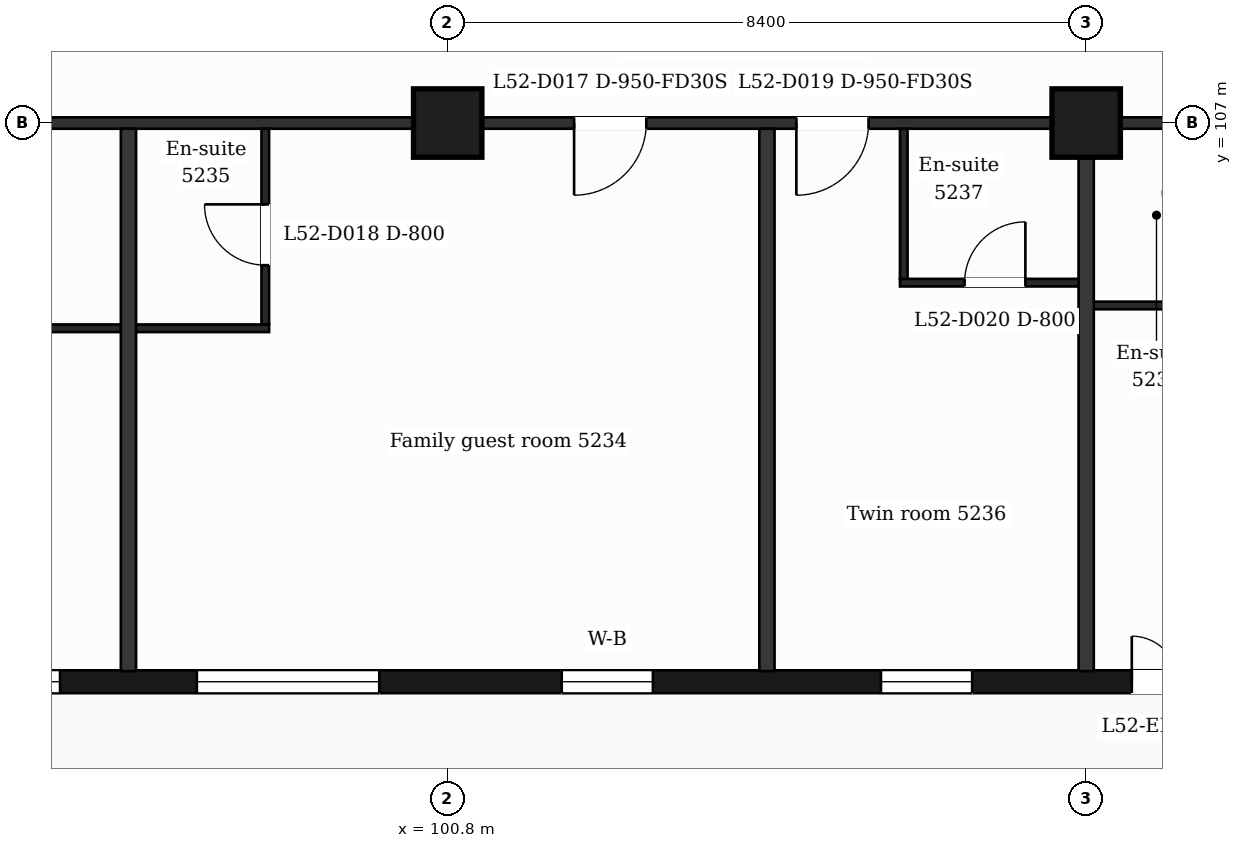
"""IFC4 building model, lengths in metres.
Left out: names, types, materials, properties, quantities, classifications, styles, units other than length and angle.
Written with IfcOpenShell. Run it as: python <this file> out.ifc"""

import sys

from ifc_helpers import new_model, si_unit, direction, frame, frame_2d, origin, origin_2d, place, context, subcontext, project, spatial, rectangle, extrude, element, fill, save


model = new_model("IFC4")
c1 = context("Model", 3, precision=1e-05, world=origin(), true_north=direction((0.0, 1.0)))
c2 = subcontext(c1, "Body", "Model", "MODEL_VIEW")
j1 = project(units=[si_unit("LENGTHUNIT", "METRE"), si_unit("PLANEANGLEUNIT", "RADIAN")], contexts=[c1])
p1 = place(None, origin())
s1 = spatial("IfcSite", under=j1, at=p1, CompositionType="ELEMENT")
p2 = place(p1, origin())
s2 = spatial("IfcBuilding", under=s1, at=p2, CompositionType="ELEMENT")
p3 = place(p2, frame((0.0, 0.0, 217.0)))
s3 = spatial("IfcBuildingStorey", under=s2, at=p3, CompositionType="ELEMENT", Elevation=217.0)
for number, where, z_axis, x_axis in (
    (1, (100.8, 107.0, 0.0), (0.0, 0.0, 1.0), (1.0, 0.0, 0.0)),
    (2, (109.2, 107.0, 0.0), (0.0, 0.0, 1.0), (1.0, 0.0, 0.0)),
):
    element("IfcColumn", number, at=place(p3, frame(where, z_axis=z_axis, x_axis=x_axis)), inside=s3, PredefinedType="COLUMN", context=c2, shape_type="SweptSolid", body=[
        extrude(rectangle(XDim=0.9, YDim=0.9, at=origin_2d()), origin(), (0.0, 0.0, 1.0), 3.7),
    ])
p4 = place(p3, frame((89.85, 99.65, 0.0), z_axis=(0.0, 0.0, 1.0), x_axis=(1.0, 0.0, 0.0)))
e3 = element("IfcWall", 3, at=p4, inside=s3, PredefinedType="SOLIDWALL", context=c2, shape_type="SweptSolid", body=[
    extrude(rectangle(XDim=47.25, YDim=0.3, at=frame_2d((23.625, 0.0))), origin(), (0.0, 0.0, 1.0), 3.38),
])
p5 = place(p4, frame((0.725, 0.0, 0.9)))
e4 = element("IfcOpeningElement", 4, at=p5, cuts=e3, PredefinedType="OPENING", context=c2, shape_type="SweptSolid", body=[
    extrude(rectangle(XDim=1.2, YDim=2.1, at=frame_2d((0.6, 1.05))), frame((0.0, 0.16, 0.0), z_axis=(0.0, -1.0, 0.0), x_axis=(1.0, 0.0, 0.0)), (0.0, 0.0, 1.0), 0.32),
])
p6 = place(p4, frame((3.45, 0.0, 0.9)))
e5 = element("IfcOpeningElement", 5, at=p6, cuts=e3, PredefinedType="OPENING", context=c2, shape_type="SweptSolid", body=[
    extrude(rectangle(XDim=2.4, YDim=2.1, at=frame_2d((1.2, 1.05))), frame((0.0, 0.16, 0.0), z_axis=(0.0, -1.0, 0.0), x_axis=(1.0, 0.0, 0.0)), (0.0, 0.0, 1.0), 0.32),
])
p7 = place(p4, frame((7.65, 0.0, 0.9)))
e6 = element("IfcOpeningElement", 6, at=p7, cuts=e3, PredefinedType="OPENING", context=c2, shape_type="SweptSolid", body=[
    extrude(rectangle(XDim=2.4, YDim=2.1, at=frame_2d((1.2, 1.05))), frame((0.0, 0.16, 0.0), z_axis=(0.0, -1.0, 0.0), x_axis=(1.0, 0.0, 0.0)), (0.0, 0.0, 1.0), 0.32),
])
p8 = place(p4, frame((12.45, 0.0, 0.9)))
e7 = element("IfcOpeningElement", 7, at=p8, cuts=e3, PredefinedType="OPENING", context=c2, shape_type="SweptSolid", body=[
    extrude(rectangle(XDim=1.2, YDim=2.1, at=frame_2d((0.6, 1.05))), frame((0.0, 0.16, 0.0), z_axis=(0.0, -1.0, 0.0), x_axis=(1.0, 0.0, 0.0)), (0.0, 0.0, 1.0), 0.32),
])
p9 = place(p4, frame((16.65, 0.0, 0.9)))
e8 = element("IfcOpeningElement", 8, at=p9, cuts=e3, PredefinedType="OPENING", context=c2, shape_type="SweptSolid", body=[
    extrude(rectangle(XDim=1.2, YDim=2.1, at=frame_2d((0.6, 1.05))), frame((0.0, 0.16, 0.0), z_axis=(0.0, -1.0, 0.0), x_axis=(1.0, 0.0, 0.0)), (0.0, 0.0, 1.0), 0.32),
])
p10 = place(p4, frame((19.95, 0.0, 0.0)))
e9 = element("IfcOpeningElement", 9, at=p10, cuts=e3, PredefinedType="OPENING", context=c2, shape_type="SweptSolid", body=[
    extrude(rectangle(XDim=1.2, YDim=2.4, at=frame_2d((0.6, 1.2))), frame((0.0, 0.16, 0.0), z_axis=(0.0, -1.0, 0.0), x_axis=(1.0, 0.0, 0.0)), (0.0, 0.0, 1.0), 0.32),
])
p11 = place(p4, frame((21.75, 0.0, 0.9)))
e10 = element("IfcOpeningElement", 10, at=p11, cuts=e3, PredefinedType="OPENING", context=c2, shape_type="SweptSolid", body=[
    extrude(rectangle(XDim=1.2, YDim=2.1, at=frame_2d((0.6, 1.05))), frame((0.0, 0.16, 0.0), z_axis=(0.0, -1.0, 0.0), x_axis=(1.0, 0.0, 0.0)), (0.0, 0.0, 1.0), 0.32),
])
p12 = place(p4, frame((24.45, 0.0, 0.9)))
e11 = element("IfcOpeningElement", 11, at=p12, cuts=e3, PredefinedType="OPENING", context=c2, shape_type="SweptSolid", body=[
    extrude(rectangle(XDim=2.4, YDim=2.1, at=frame_2d((1.2, 1.05))), frame((0.0, 0.16, 0.0), z_axis=(0.0, -1.0, 0.0), x_axis=(1.0, 0.0, 0.0)), (0.0, 0.0, 1.0), 0.32),
])
p13 = place(p4, frame((28.35, 0.0, 0.0)))
e12 = element("IfcOpeningElement", 12, at=p13, cuts=e3, PredefinedType="OPENING", context=c2, shape_type="SweptSolid", body=[
    extrude(rectangle(XDim=1.2, YDim=2.4, at=frame_2d((0.6, 1.2))), frame((0.0, 0.16, 0.0), z_axis=(0.0, -1.0, 0.0), x_axis=(1.0, 0.0, 0.0)), (0.0, 0.0, 1.0), 0.32),
])
p14 = place(p4, frame((30.15, 0.0, 0.9)))
e13 = element("IfcOpeningElement", 13, at=p14, cuts=e3, PredefinedType="OPENING", context=c2, shape_type="SweptSolid", body=[
    extrude(rectangle(XDim=1.2, YDim=2.1, at=frame_2d((0.6, 1.05))), frame((0.0, 0.16, 0.0), z_axis=(0.0, -1.0, 0.0), x_axis=(1.0, 0.0, 0.0)), (0.0, 0.0, 1.0), 0.32),
])
p15 = place(p4, frame((32.85, 0.0, 0.9)))
e14 = element("IfcOpeningElement", 14, at=p15, cuts=e3, PredefinedType="OPENING", context=c2, shape_type="SweptSolid", body=[
    extrude(rectangle(XDim=2.4, YDim=2.1, at=frame_2d((1.2, 1.05))), frame((0.0, 0.16, 0.0), z_axis=(0.0, -1.0, 0.0), x_axis=(1.0, 0.0, 0.0)), (0.0, 0.0, 1.0), 0.32),
])
p16 = place(p4, frame((37.05, 0.0, 0.9)))
e15 = element("IfcOpeningElement", 15, at=p16, cuts=e3, PredefinedType="OPENING", context=c2, shape_type="SweptSolid", body=[
    extrude(rectangle(XDim=2.4, YDim=2.1, at=frame_2d((1.2, 1.05))), frame((0.0, 0.16, 0.0), z_axis=(0.0, -1.0, 0.0), x_axis=(1.0, 0.0, 0.0)), (0.0, 0.0, 1.0), 0.32),
])
p17 = place(p4, frame((41.85, 0.0, 0.9)))
e16 = element("IfcOpeningElement", 16, at=p17, cuts=e3, PredefinedType="OPENING", context=c2, shape_type="SweptSolid", body=[
    extrude(rectangle(XDim=1.2, YDim=2.1, at=frame_2d((0.6, 1.05))), frame((0.0, 0.16, 0.0), z_axis=(0.0, -1.0, 0.0), x_axis=(1.0, 0.0, 0.0)), (0.0, 0.0, 1.0), 0.32),
])
p18 = place(p4, frame((45.25, 0.0, 0.9)))
e17 = element("IfcOpeningElement", 17, at=p18, cuts=e3, PredefinedType="OPENING", context=c2, shape_type="SweptSolid", body=[
    extrude(rectangle(XDim=1.2, YDim=2.1, at=frame_2d((0.6, 1.05))), frame((0.0, 0.16, 0.0), z_axis=(0.0, -1.0, 0.0), x_axis=(1.0, 0.0, 0.0)), (0.0, 0.0, 1.0), 0.32),
])
p19 = place(p3, frame((94.45, 104.3, 0.0), z_axis=(0.0, 0.0, 1.0), x_axis=(1.0, 0.0, 0.0)))
e18 = element("IfcWall", 18, at=p19, inside=s3, PredefinedType="PARTITIONING", context=c2, shape_type="SweptSolid", body=[
    extrude(rectangle(XDim=4.0, YDim=0.1, at=frame_2d((2.0, 0.0))), origin(), (0.0, 0.0, 1.0), 3.38),
])
p20 = place(p3, frame((109.2, 104.6, 0.0), z_axis=(0.0, 0.0, 1.0), x_axis=(1.0, 0.0, 0.0)))
e19 = element("IfcWall", 19, at=p20, inside=s3, PredefinedType="PARTITIONING", context=c2, shape_type="SweptSolid", body=[
    extrude(rectangle(XDim=1.85, YDim=0.1, at=frame_2d((0.925, 0.0))), origin(), (0.0, 0.0, 1.0), 3.38),
])
p21 = place(p3, frame((106.75, 104.9, 0.0), z_axis=(0.0, 0.0, 1.0), x_axis=(1.0, 0.0, 0.0)))
e20 = element("IfcWall", 20, at=p21, inside=s3, PredefinedType="PARTITIONING", context=c2, shape_type="SweptSolid", body=[
    extrude(rectangle(XDim=2.45, YDim=0.1, at=frame_2d((1.225, 0.0))), origin(), (0.0, 0.0, 1.0), 3.38),
])
p22 = place(p21, frame((0.85, 0.0, 0.0)))
e21 = element("IfcOpeningElement", 21, at=p22, cuts=e20, PredefinedType="OPENING", context=c2, shape_type="SweptSolid", body=[
    extrude(rectangle(XDim=0.8, YDim=2.1, at=frame_2d((0.4, 1.05))), frame((0.0, 0.06, 0.0), z_axis=(0.0, -1.0, 0.0), x_axis=(1.0, 0.0, 0.0)), (0.0, 0.0, 1.0), 0.12),
])
p23 = place(p3, frame((87.018, 107.0, 0.0), z_axis=(0.0, 0.0, 1.0), x_axis=(1.0, 0.0, 0.0)))
e22 = element("IfcWall", 22, at=p23, inside=s3, PredefinedType="PARTITIONING", context=c2, shape_type="SweptSolid", body=[
    extrude(rectangle(XDim=52.765, YDim=0.15, at=frame_2d((26.382, 0.0))), origin(), (0.0, 0.0, 1.0), 3.38),
])
p24 = place(p23, frame((1.276, 0.0, 0.0)))
e23 = element("IfcOpeningElement", 23, at=p24, cuts=e22, PredefinedType="OPENING", context=c2, shape_type="SweptSolid", body=[
    extrude(rectangle(XDim=0.95, YDim=2.1, at=frame_2d((0.475, 1.05))), frame((0.0, 0.085, 0.0), z_axis=(0.0, -1.0, 0.0), x_axis=(1.0, 0.0, 0.0)), (0.0, 0.0, 1.0), 0.17),
])
p25 = place(p23, frame((6.034, 0.0, 0.0)))
e24 = element("IfcOpeningElement", 24, at=p25, cuts=e22, PredefinedType="OPENING", context=c2, shape_type="SweptSolid", body=[
    extrude(rectangle(XDim=0.95, YDim=2.1, at=frame_2d((0.475, 1.05))), frame((0.0, 0.085, 0.0), z_axis=(0.0, -1.0, 0.0), x_axis=(1.0, 0.0, 0.0)), (0.0, 0.0, 1.0), 0.17),
])
p26 = place(p23, frame((15.445, 0.0, 0.0)))
e25 = element("IfcOpeningElement", 25, at=p26, cuts=e22, PredefinedType="OPENING", context=c2, shape_type="SweptSolid", body=[
    extrude(rectangle(XDim=0.95, YDim=2.1, at=frame_2d((0.475, 1.05))), frame((0.0, 0.085, 0.0), z_axis=(0.0, -1.0, 0.0), x_axis=(1.0, 0.0, 0.0)), (0.0, 0.0, 1.0), 0.17),
])
p27 = place(p23, frame((18.369, 0.0, 0.0)))
e26 = element("IfcOpeningElement", 26, at=p27, cuts=e22, PredefinedType="OPENING", context=c2, shape_type="SweptSolid", body=[
    extrude(rectangle(XDim=0.95, YDim=2.1, at=frame_2d((0.475, 1.05))), frame((0.0, 0.085, 0.0), z_axis=(0.0, -1.0, 0.0), x_axis=(1.0, 0.0, 0.0)), (0.0, 0.0, 1.0), 0.17),
])
p28 = place(p23, frame((24.519, 0.0, 0.0)))
e27 = element("IfcOpeningElement", 27, at=p28, cuts=e22, PredefinedType="OPENING", context=c2, shape_type="SweptSolid", body=[
    extrude(rectangle(XDim=0.95, YDim=2.1, at=frame_2d((0.475, 1.05))), frame((0.0, 0.085, 0.0), z_axis=(0.0, -1.0, 0.0), x_axis=(1.0, 0.0, 0.0)), (0.0, 0.0, 1.0), 0.17),
])
p29 = place(p23, frame((26.632, 0.0, 0.0)))
e28 = element("IfcOpeningElement", 28, at=p29, cuts=e22, PredefinedType="OPENING", context=c2, shape_type="SweptSolid", body=[
    extrude(rectangle(XDim=1.0, YDim=2.1, at=frame_2d((0.5, 1.05))), frame((0.0, 0.085, 0.0), z_axis=(0.0, -1.0, 0.0), x_axis=(1.0, 0.0, 0.0)), (0.0, 0.0, 1.0), 0.17),
])
p30 = place(p23, frame((33.422, 0.0, 0.0)))
e29 = element("IfcOpeningElement", 29, at=p30, cuts=e22, PredefinedType="OPENING", context=c2, shape_type="SweptSolid", body=[
    extrude(rectangle(XDim=0.95, YDim=2.1, at=frame_2d((0.475, 1.05))), frame((0.0, 0.085, 0.0), z_axis=(0.0, -1.0, 0.0), x_axis=(1.0, 0.0, 0.0)), (0.0, 0.0, 1.0), 0.17),
])
p31 = place(p23, frame((35.057, 0.0, 0.0)))
e30 = element("IfcOpeningElement", 30, at=p31, cuts=e22, PredefinedType="OPENING", context=c2, shape_type="SweptSolid", body=[
    extrude(rectangle(XDim=0.95, YDim=2.1, at=frame_2d((0.475, 1.05))), frame((0.0, 0.085, 0.0), z_axis=(0.0, -1.0, 0.0), x_axis=(1.0, 0.0, 0.0)), (0.0, 0.0, 1.0), 0.17),
])
p32 = place(p23, frame((44.532, 0.0, 0.0)))
e31 = element("IfcOpeningElement", 31, at=p32, cuts=e22, PredefinedType="OPENING", context=c2, shape_type="SweptSolid", body=[
    extrude(rectangle(XDim=1.0, YDim=2.1, at=frame_2d((0.5, 1.05))), frame((0.0, 0.085, 0.0), z_axis=(0.0, -1.0, 0.0), x_axis=(1.0, 0.0, 0.0)), (0.0, 0.0, 1.0), 0.17),
])
p33 = place(p23, frame((48.249, 0.0, 0.0)))
e32 = element("IfcOpeningElement", 32, at=p33, cuts=e22, PredefinedType="OPENING", context=c2, shape_type="SweptSolid", body=[
    extrude(rectangle(XDim=0.95, YDim=2.1, at=frame_2d((0.475, 1.05))), frame((0.0, 0.085, 0.0), z_axis=(0.0, -1.0, 0.0), x_axis=(1.0, 0.0, 0.0)), (0.0, 0.0, 1.0), 0.17),
])
p34 = place(p3, frame((96.6, 99.79, 0.0), z_axis=(0.0, 0.0, 1.0), x_axis=(0.0, 1.0, 0.0)))
e33 = element("IfcWall", 33, at=p34, inside=s3, PredefinedType="PARTITIONING", context=c2, shape_type="SweptSolid", body=[
    extrude(rectangle(XDim=7.135, YDim=0.2, at=frame_2d((3.567, 0.0))), origin(), (0.0, 0.0, 1.0), 3.38),
])
p35 = place(p3, frame((98.4, 104.35, 0.0), z_axis=(0.0, 0.0, 1.0), x_axis=(0.0, 1.0, 0.0)))
e34 = element("IfcWall", 34, at=p35, inside=s3, PredefinedType="PARTITIONING", context=c2, shape_type="SweptSolid", body=[
    extrude(rectangle(XDim=2.575, YDim=0.1, at=frame_2d((1.288, 0.0))), origin(), (0.0, 0.0, 1.0), 3.38),
])
p36 = place(p35, frame((0.78, 0.0, 0.0)))
e35 = element("IfcOpeningElement", 35, at=p36, cuts=e34, PredefinedType="OPENING", context=c2, shape_type="SweptSolid", body=[
    extrude(rectangle(XDim=0.8, YDim=2.1, at=frame_2d((0.4, 1.05))), frame((0.0, 0.06, 0.0), z_axis=(0.0, -1.0, 0.0), x_axis=(1.0, 0.0, 0.0)), (0.0, 0.0, 1.0), 0.12),
])
p37 = place(p3, frame((105.0, 99.79, 0.0), z_axis=(0.0, 0.0, 1.0), x_axis=(0.0, 1.0, 0.0)))
e36 = element("IfcWall", 36, at=p37, inside=s3, PredefinedType="PARTITIONING", context=c2, shape_type="SweptSolid", body=[
    extrude(rectangle(XDim=7.135, YDim=0.2, at=frame_2d((3.567, 0.0))), origin(), (0.0, 0.0, 1.0), 3.38),
])
p38 = place(p3, frame((106.8, 104.95, 0.0), z_axis=(0.0, 0.0, 1.0), x_axis=(0.0, 1.0, 0.0)))
e37 = element("IfcWall", 37, at=p38, inside=s3, PredefinedType="PARTITIONING", context=c2, shape_type="SweptSolid", body=[
    extrude(rectangle(XDim=1.975, YDim=0.1, at=frame_2d((0.988, 0.0))), origin(), (0.0, 0.0, 1.0), 3.38),
])
p39 = place(p3, frame((109.2, 99.79, 0.0), z_axis=(0.0, 0.0, 1.0), x_axis=(0.0, 1.0, 0.0)))
e38 = element("IfcWall", 38, at=p39, inside=s3, PredefinedType="PARTITIONING", context=c2, shape_type="SweptSolid", body=[
    extrude(rectangle(XDim=7.135, YDim=0.2, at=frame_2d((3.567, 0.0))), origin(), (0.0, 0.0, 1.0), 3.38),
])
p40 = place(p6, origin())
e39 = element("IfcWindow", 39, at=p40, inside=s3, PartitioningType="SINGLE_PANEL", PredefinedType="WINDOW", context=c2, shape_type="SweptSolid", body=[
    extrude(rectangle(XDim=2.4, YDim=2.1, at=frame_2d((1.2, 1.05))), frame((0.0, 0.03, 0.0), z_axis=(0.0, -1.0, 0.0), x_axis=(1.0, 0.0, 0.0)), (0.0, 0.0, 1.0), 0.06),
])
fill(e5, e39)
p41 = place(p7, origin())
e40 = element("IfcWindow", 40, at=p41, inside=s3, PartitioningType="SINGLE_PANEL", PredefinedType="WINDOW", context=c2, shape_type="SweptSolid", body=[
    extrude(rectangle(XDim=2.4, YDim=2.1, at=frame_2d((1.2, 1.05))), frame((0.0, 0.03, 0.0), z_axis=(0.0, -1.0, 0.0), x_axis=(1.0, 0.0, 0.0)), (0.0, 0.0, 1.0), 0.06),
])
fill(e6, e40)
p42 = place(p8, origin())
e41 = element("IfcWindow", 41, at=p42, inside=s3, PartitioningType="SINGLE_PANEL", PredefinedType="WINDOW", context=c2, shape_type="SweptSolid", body=[
    extrude(rectangle(XDim=1.2, YDim=2.1, at=frame_2d((0.6, 1.05))), frame((0.0, 0.03, 0.0), z_axis=(0.0, -1.0, 0.0), x_axis=(1.0, 0.0, 0.0)), (0.0, 0.0, 1.0), 0.06),
])
fill(e7, e41)
p43 = place(p9, origin())
e42 = element("IfcWindow", 42, at=p43, inside=s3, PartitioningType="SINGLE_PANEL", PredefinedType="WINDOW", context=c2, shape_type="SweptSolid", body=[
    extrude(rectangle(XDim=1.2, YDim=2.1, at=frame_2d((0.6, 1.05))), frame((0.0, 0.03, 0.0), z_axis=(0.0, -1.0, 0.0), x_axis=(1.0, 0.0, 0.0)), (0.0, 0.0, 1.0), 0.06),
])
fill(e8, e42)
p44 = place(p10, origin())
e43 = element("IfcDoor", 43, at=p44, inside=s3, OperationType="DOUBLE_DOOR_SINGLE_SWING", PredefinedType="DOOR", context=c2, shape_type="SweptSolid", body=[
    extrude(rectangle(XDim=1.2, YDim=2.4, at=frame_2d((0.6, 1.2))), frame((0.0, 0.025, 0.0), z_axis=(0.0, -1.0, 0.0), x_axis=(1.0, 0.0, 0.0)), (0.0, 0.0, 1.0), 0.05),
])
fill(e9, e43)
p45 = place(p26, origin())
e44 = element("IfcDoor", 44, at=p45, inside=s3, OperationType="SINGLE_SWING_LEFT", PredefinedType="DOOR", context=c2, shape_type="SweptSolid", body=[
    extrude(rectangle(XDim=0.95, YDim=2.1, at=frame_2d((0.475, 1.05))), frame((0.0, 0.025, 0.0), z_axis=(0.0, -1.0, 0.0), x_axis=(1.0, 0.0, 0.0)), (0.0, 0.0, 1.0), 0.05),
])
fill(e25, e44)
p46 = place(p36, origin())
e45 = element("IfcDoor", 45, at=p46, inside=s3, OperationType="SINGLE_SWING_RIGHT", PredefinedType="DOOR", context=c2, shape_type="SweptSolid", body=[
    extrude(rectangle(XDim=0.8, YDim=2.1, at=frame_2d((0.4, 1.05))), frame((0.0, 0.025, 0.0), z_axis=(0.0, -1.0, 0.0), x_axis=(1.0, 0.0, 0.0)), (0.0, 0.0, 1.0), 0.05),
])
fill(e35, e45)
p47 = place(p27, origin())
e46 = element("IfcDoor", 46, at=p47, inside=s3, OperationType="SINGLE_SWING_LEFT", PredefinedType="DOOR", context=c2, shape_type="SweptSolid", body=[
    extrude(rectangle(XDim=0.95, YDim=2.1, at=frame_2d((0.475, 1.05))), frame((0.0, 0.025, 0.0), z_axis=(0.0, -1.0, 0.0), x_axis=(1.0, 0.0, 0.0)), (0.0, 0.0, 1.0), 0.05),
])
fill(e26, e46)
p48 = place(p22, origin())
e47 = element("IfcDoor", 47, at=p48, inside=s3, OperationType="SINGLE_SWING_RIGHT", PredefinedType="DOOR", context=c2, shape_type="SweptSolid", body=[
    extrude(rectangle(XDim=0.8, YDim=2.1, at=frame_2d((0.4, 1.05))), frame((0.0, 0.025, 0.0), z_axis=(0.0, -1.0, 0.0), x_axis=(1.0, 0.0, 0.0)), (0.0, 0.0, 1.0), 0.05),
])
fill(e21, e47)
save(model, sys.argv[1])
